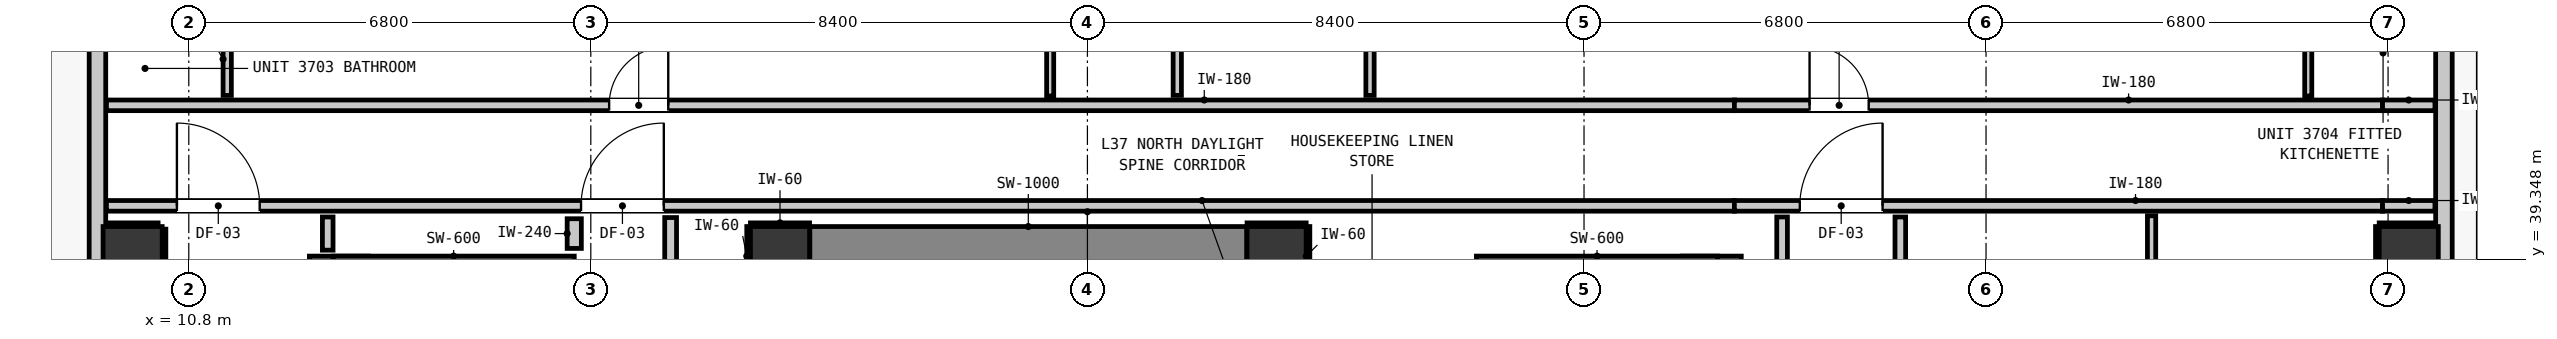
"""IFC4 building model, lengths in metres.
Left out: names, types, materials, properties, quantities, classifications, styles, units other than length and angle.
Written with IfcOpenShell. Run it as: python <this file> out.ifc"""

import sys

from ifc_helpers import new_model, si_unit, direction, frame, frame_2d, origin, origin_2d, place, context, subcontext, project, spatial, rectangle, extrude, element, fill, save


model = new_model("IFC4")
c1 = context("Model", 3, precision=1e-05, world=origin(), true_north=direction((0.0, 1.0)))
c2 = subcontext(c1, "Body", "Model", "MODEL_VIEW")
j1 = project(units=[si_unit("LENGTHUNIT", "METRE"), si_unit("PLANEANGLEUNIT", "RADIAN")], contexts=[c1])
p1 = place(None, origin())
s1 = spatial("IfcSite", under=j1, at=p1, CompositionType="ELEMENT")
p2 = place(p1, origin())
s2 = spatial("IfcBuilding", under=s1, at=p2, CompositionType="ELEMENT")
p3 = place(p2, frame((0.0, 0.0, 129.32)))
s3 = spatial("IfcBuildingStorey", under=s2, at=p3, CompositionType="ELEMENT", Elevation=129.32)
for number, where, z_axis, x_axis in (
    (1, (20.8, 39.4, 0.0), (0.0, 0.0, 1.0), (1.0, 0.0, 0.0)),
    (2, (29.2, 39.4, 0.0), (0.0, 0.0, 1.0), (1.0, 0.0, 0.0)),
):
    element("IfcColumn", number, at=place(p3, frame(where, z_axis=z_axis, x_axis=x_axis)), inside=s3, PredefinedType="COLUMN", context=c2, shape_type="SweptSolid", body=[
        extrude(rectangle(XDim=1.0, YDim=1.0, at=origin_2d()), origin(), (0.0, 0.0, 1.0), 3.32),
    ])
p4 = place(p3, frame((13.34, 31.205, 0.0), z_axis=(0.0, 0.0, 1.0), x_axis=(0.0, 1.0, 0.0)))
e3 = element("IfcWall", 3, at=p4, inside=s3, PredefinedType="SHEAR", context=c2, shape_type="SweptSolid", body=[
    extrude(rectangle(XDim=8.195, YDim=1.0, at=frame_2d((4.097, 0.0))), origin(), (0.0, 0.0, 1.0), 3.32),
])
p5 = place(p3, frame((13.24, 39.1, 0.0), z_axis=(0.0, 0.0, 1.0), x_axis=(1.0, 0.0, 0.0)))
e4 = element("IfcWall", 4, at=p5, inside=s3, PredefinedType="SHEAR", context=c2, shape_type="SweptSolid", body=[
    extrude(rectangle(XDim=4.08, YDim=0.6, at=frame_2d((2.04, 0.0))), origin(), (0.0, 0.0, 1.0), 3.32),
])
p6 = place(p3, frame((36.56, 31.205, 0.0), z_axis=(0.0, 0.0, 1.0), x_axis=(0.0, 1.0, 0.0)))
e5 = element("IfcWall", 5, at=p6, inside=s3, PredefinedType="SHEAR", context=c2, shape_type="SweptSolid", body=[
    extrude(rectangle(XDim=8.195, YDim=1.0, at=frame_2d((4.097, 0.0))), origin(), (0.0, 0.0, 1.0), 3.32),
])
p7 = place(p3, frame((32.58, 39.1, 0.0), z_axis=(0.0, 0.0, 1.0), x_axis=(1.0, 0.0, 0.0)))
e6 = element("IfcWall", 6, at=p7, inside=s3, PredefinedType="SHEAR", context=c2, shape_type="SweptSolid", body=[
    extrude(rectangle(XDim=4.08, YDim=0.6, at=frame_2d((2.04, 0.0))), origin(), (0.0, 0.0, 1.0), 3.32),
])
p8 = place(p3, frame((21.305, 39.4, 0.0), z_axis=(0.0, 0.0, 1.0), x_axis=(1.0, 0.0, 0.0)))
e7 = element("IfcWall", 7, at=p8, inside=s3, PredefinedType="SHEAR", context=c2, shape_type="SweptSolid", body=[
    extrude(rectangle(XDim=7.39, YDim=1.0, at=frame_2d((3.695, 0.0))), origin(), (0.0, 0.0, 1.0), 3.32),
])
for number, where, z_axis, x_axis in (
    (8, (9.85, 39.4, 0.0), (0.0, 0.0, 1.0), (1.0, 0.0, 0.0)),
    (9, (48.35, 39.4, 0.0), (0.0, 0.0, 1.0), (1.0, 0.0, 0.0)),
):
    element("IfcColumn", number, at=place(p3, frame(where, z_axis=z_axis, x_axis=x_axis)), inside=s3, PredefinedType="COLUMN", context=c2, shape_type="SweptSolid", body=[
        extrude(rectangle(XDim=1.0, YDim=1.0, at=origin_2d()), origin(), (0.0, 0.0, 1.0), 3.32),
    ])
p9 = place(p3, frame((9.255, 11.355, 0.0), z_axis=(0.0, 0.0, 1.0), x_axis=(0.0, 1.0, 0.0)))
e10 = element("IfcWall", 10, at=p9, inside=s3, PredefinedType="STANDARD", context=c2, shape_type="SweptSolid", body=[
    extrude(rectangle(XDim=32.29, YDim=0.28, at=frame_2d((16.145, 0.0))), origin(), (0.0, 0.0, 1.0), 3.08),
])
p10 = place(p9, frame((5.818, 0.0, 0.0)))
e11 = element("IfcOpeningElement", 11, at=p10, cuts=e10, PredefinedType="OPENING", context=c2, shape_type="SweptSolid", body=[
    extrude(rectangle(XDim=1.0, YDim=2.15, at=frame_2d((0.5, 1.075))), frame((0.0, 0.15, 0.0), z_axis=(0.0, -1.0, 0.0), x_axis=(1.0, 0.0, 0.0)), (0.0, 0.0, 1.0), 0.3),
])
p11 = place(p9, frame((0.544, 0.0, 0.85)))
e12 = element("IfcOpeningElement", 12, at=p11, cuts=e10, PredefinedType="OPENING", context=c2, shape_type="SweptSolid", body=[
    extrude(rectangle(XDim=1.05, YDim=1.65, at=frame_2d((0.525, 0.825))), frame((0.0, 0.15, 0.0), z_axis=(0.0, -1.0, 0.0), x_axis=(1.0, 0.0, 0.0)), (0.0, 0.0, 1.0), 0.3),
])
p12 = place(p3, frame((48.945, 43.645, 0.0), z_axis=(0.0, 0.0, 1.0), x_axis=(0.0, -1.0, 0.0)))
e13 = element("IfcWall", 13, at=p12, inside=s3, PredefinedType="STANDARD", context=c2, shape_type="SweptSolid", body=[
    extrude(rectangle(XDim=32.29, YDim=0.28, at=frame_2d((16.145, 0.0))), origin(), (0.0, 0.0, 1.0), 3.08),
])
p13 = place(p12, frame((5.467, 0.0, 0.0)))
e14 = element("IfcOpeningElement", 14, at=p13, cuts=e13, PredefinedType="OPENING", context=c2, shape_type="SweptSolid", body=[
    extrude(rectangle(XDim=1.0, YDim=2.15, at=frame_2d((0.5, 1.075))), frame((0.0, 0.15, 0.0), z_axis=(0.0, -1.0, 0.0), x_axis=(1.0, 0.0, 0.0)), (0.0, 0.0, 1.0), 0.3),
])
p14 = place(p12, frame((30.696, 0.0, 0.85)))
e15 = element("IfcOpeningElement", 15, at=p14, cuts=e13, PredefinedType="OPENING", context=c2, shape_type="SweptSolid", body=[
    extrude(rectangle(XDim=1.05, YDim=1.65, at=frame_2d((0.525, 0.825))), frame((0.0, 0.15, 0.0), z_axis=(0.0, -1.0, 0.0), x_axis=(1.0, 0.0, 0.0)), (0.0, 0.0, 1.0), 0.3),
])
p15 = place(p12, frame((14.761, 0.0, 0.85)))
e16 = element("IfcOpeningElement", 16, at=p15, cuts=e13, PredefinedType="OPENING", context=c2, shape_type="SweptSolid", body=[
    extrude(rectangle(XDim=1.8, YDim=1.9, at=frame_2d((0.9, 0.95))), frame((0.0, 0.15, 0.0), z_axis=(0.0, -1.0, 0.0), x_axis=(1.0, 0.0, 0.0)), (0.0, 0.0, 1.0), 0.3),
])
p16 = place(p12, frame((7.106, 0.0, 0.85)))
e17 = element("IfcOpeningElement", 17, at=p16, cuts=e13, PredefinedType="OPENING", context=c2, shape_type="SweptSolid", body=[
    extrude(rectangle(XDim=1.05, YDim=1.65, at=frame_2d((0.525, 0.825))), frame((0.0, 0.15, 0.0), z_axis=(0.0, -1.0, 0.0), x_axis=(1.0, 0.0, 0.0)), (0.0, 0.0, 1.0), 0.3),
])
p17 = place(p3, frame((9.407, 40.25, 0.0), z_axis=(0.0, 0.0, 1.0), x_axis=(1.0, 0.0, 0.0)))
e18 = element("IfcWall", 18, at=p17, inside=s3, PredefinedType="PARTITIONING", context=c2, shape_type="SweptSolid", body=[
    extrude(rectangle(XDim=27.536, YDim=0.18, at=frame_2d((13.768, 0.0))), origin(), (0.0, 0.0, 1.0), 3.08),
])
p18 = place(p17, frame((8.028, 0.0, 0.0)))
e19 = element("IfcOpeningElement", 19, at=p18, cuts=e18, PredefinedType="OPENING", context=c2, shape_type="SweptSolid", body=[
    extrude(rectangle(XDim=1.4, YDim=2.15, at=frame_2d((0.7, 1.075))), frame((0.0, 0.1, 0.0), z_axis=(0.0, -1.0, 0.0), x_axis=(1.0, 0.0, 0.0)), (0.0, 0.0, 1.0), 0.2),
])
p19 = place(p17, frame((1.192, 0.0, 0.0)))
e20 = element("IfcOpeningElement", 20, at=p19, cuts=e18, PredefinedType="OPENING", context=c2, shape_type="SweptSolid", body=[
    extrude(rectangle(XDim=1.4, YDim=2.15, at=frame_2d((0.7, 1.075))), frame((0.0, 0.1, 0.0), z_axis=(0.0, -1.0, 0.0), x_axis=(1.0, 0.0, 0.0)), (0.0, 0.0, 1.0), 0.2),
])
p20 = place(p3, frame((36.943, 40.25, 0.0), z_axis=(0.0, 0.0, 1.0), x_axis=(1.0, 0.0, 0.0)))
e21 = element("IfcWall", 21, at=p20, inside=s3, PredefinedType="PARTITIONING", context=c2, shape_type="SweptSolid", body=[
    extrude(rectangle(XDim=10.964, YDim=0.18, at=frame_2d((5.482, 0.0))), origin(), (0.0, 0.0, 1.0), 2.565),
])
p21 = place(p20, frame((1.107, 0.0, 0.0)))
e22 = element("IfcOpeningElement", 22, at=p21, cuts=e21, PredefinedType="OPENING", context=c2, shape_type="SweptSolid", body=[
    extrude(rectangle(XDim=1.4, YDim=2.15, at=frame_2d((0.7, 1.075))), frame((0.0, 0.1, 0.0), z_axis=(0.0, -1.0, 0.0), x_axis=(1.0, 0.0, 0.0)), (0.0, 0.0, 1.0), 0.2),
])
p22 = place(p3, frame((47.907, 40.25, 0.0), z_axis=(0.0, 0.0, 1.0), x_axis=(1.0, 0.0, 0.0)))
e23 = element("IfcWall", 23, at=p22, inside=s3, PredefinedType="PARTITIONING", context=c2, shape_type="SweptSolid", body=[
    extrude(rectangle(XDim=0.886, YDim=0.18, at=frame_2d((0.443, 0.0))), origin(), (0.0, 0.0, 1.0), 3.08),
])
p23 = place(p3, frame((9.407, 41.95, 0.0), z_axis=(0.0, 0.0, 1.0), x_axis=(1.0, 0.0, 0.0)))
e24 = element("IfcWall", 24, at=p23, inside=s3, PredefinedType="PARTITIONING", context=c2, shape_type="SweptSolid", body=[
    extrude(rectangle(XDim=27.536, YDim=0.18, at=frame_2d((13.768, 0.0))), origin(), (0.0, 0.0, 1.0), 3.08),
])
p24 = place(p23, frame((8.503, 0.0, 0.0)))
e25 = element("IfcOpeningElement", 25, at=p24, cuts=e24, PredefinedType="OPENING", context=c2, shape_type="SweptSolid", body=[
    extrude(rectangle(XDim=1.0, YDim=2.15, at=frame_2d((0.5, 1.075))), frame((0.0, 0.1, 0.0), z_axis=(0.0, -1.0, 0.0), x_axis=(1.0, 0.0, 0.0)), (0.0, 0.0, 1.0), 0.2),
])
p25 = place(p3, frame((36.943, 41.95, 0.0), z_axis=(0.0, 0.0, 1.0), x_axis=(1.0, 0.0, 0.0)))
e26 = element("IfcWall", 26, at=p25, inside=s3, PredefinedType="PARTITIONING", context=c2, shape_type="SweptSolid", body=[
    extrude(rectangle(XDim=10.964, YDim=0.18, at=frame_2d((5.482, 0.0))), origin(), (0.0, 0.0, 1.0), 2.565),
])
p26 = place(p25, frame((1.272, 0.0, 0.0)))
e27 = element("IfcOpeningElement", 27, at=p26, cuts=e26, PredefinedType="OPENING", context=c2, shape_type="SweptSolid", body=[
    extrude(rectangle(XDim=1.0, YDim=2.15, at=frame_2d((0.5, 1.075))), frame((0.0, 0.1, 0.0), z_axis=(0.0, -1.0, 0.0), x_axis=(1.0, 0.0, 0.0)), (0.0, 0.0, 1.0), 0.2),
])
p27 = place(p3, frame((47.907, 41.95, 0.0), z_axis=(0.0, 0.0, 1.0), x_axis=(1.0, 0.0, 0.0)))
e28 = element("IfcWall", 28, at=p27, inside=s3, PredefinedType="PARTITIONING", context=c2, shape_type="SweptSolid", body=[
    extrude(rectangle(XDim=0.886, YDim=0.18, at=frame_2d((0.443, 0.0))), origin(), (0.0, 0.0, 1.0), 3.08),
])
p28 = place(p3, frame((17.32, 39.53, 0.0), z_axis=(0.0, 0.0, 1.0), x_axis=(0.0, 1.0, 0.0)))
e29 = element("IfcWall", 29, at=p28, inside=s3, PredefinedType="PARTITIONING", context=c2, shape_type="SweptSolid", body=[
    extrude(rectangle(XDim=0.502, YDim=0.24, at=frame_2d((0.251, 0.0))), origin(), (0.0, 0.0, 1.0), 3.08),
])
p29 = place(p3, frame((18.95, 38.918, 0.0), z_axis=(0.0, 0.0, 1.0), x_axis=(0.0, 1.0, 0.0)))
e30 = element("IfcWall", 30, at=p29, inside=s3, PredefinedType="PARTITIONING", context=c2, shape_type="SweptSolid", body=[
    extrude(rectangle(XDim=1.134, YDim=0.2, at=frame_2d((0.567, 0.0))), origin(), (0.0, 0.0, 1.0), 3.08),
])
p30 = place(p3, frame((13.15, 39.5, 0.0), z_axis=(0.0, 0.0, 1.0), x_axis=(0.0, 1.0, 0.0)))
e31 = element("IfcWall", 31, at=p30, inside=s3, PredefinedType="PARTITIONING", context=c2, shape_type="SweptSolid", body=[
    extrude(rectangle(XDim=0.562, YDim=0.18, at=frame_2d((0.281, 0.0))), origin(), (0.0, 0.0, 1.0), 2.315),
])
p31 = place(p3, frame((37.75, 21.368, 0.0), z_axis=(0.0, 0.0, 1.0), x_axis=(0.0, 1.0, 0.0)))
e32 = element("IfcWall", 32, at=p31, inside=s3, PredefinedType="PARTITIONING", context=c2, shape_type="SweptSolid", body=[
    extrude(rectangle(XDim=18.694, YDim=0.18, at=frame_2d((9.347, 0.0))), origin(), (0.0, 0.0, 1.0), 3.08),
])
p32 = place(p3, frame((39.75, 35.118, 0.0), z_axis=(0.0, 0.0, 1.0), x_axis=(0.0, 1.0, 0.0)))
e33 = element("IfcWall", 33, at=p32, inside=s3, PredefinedType="PARTITIONING", context=c2, shape_type="SweptSolid", body=[
    extrude(rectangle(XDim=4.944, YDim=0.18, at=frame_2d((2.472, 0.0))), origin(), (0.0, 0.0, 1.0), 3.08),
])
p33 = place(p3, frame((11.45, 42.118, 0.0), z_axis=(0.0, 0.0, 1.0), x_axis=(0.0, 1.0, 0.0)))
e34 = element("IfcWall", 34, at=p33, inside=s3, PredefinedType="PARTITIONING", context=c2, shape_type="SweptSolid", body=[
    extrude(rectangle(XDim=2.808, YDim=0.14, at=frame_2d((1.404, 0.0))), origin(), (0.0, 0.0, 1.0), 2.565),
])
p34 = place(p33, frame((1.327, 0.0, 0.0)))
e35 = element("IfcOpeningElement", 35, at=p34, cuts=e34, PredefinedType="OPENING", context=c2, shape_type="SweptSolid", body=[
    extrude(rectangle(XDim=0.86, YDim=2.02, at=frame_2d((0.43, 1.01))), frame((0.0, 0.08, 0.0), z_axis=(0.0, -1.0, 0.0), x_axis=(1.0, 0.0, 0.0)), (0.0, 0.0, 1.0), 0.16),
])
p35 = place(p3, frame((27.52, 42.118, 0.0), z_axis=(0.0, 0.0, 1.0), x_axis=(0.0, 1.0, 0.0)))
e36 = element("IfcWall", 36, at=p35, inside=s3, PredefinedType="PARTITIONING", context=c2, shape_type="SweptSolid", body=[
    extrude(rectangle(XDim=3.675, YDim=0.14, at=frame_2d((1.837, 0.0))), origin(), (0.0, 0.0, 1.0), 3.08),
])
p36 = place(p3, frame((30.78, 42.118, 0.0), z_axis=(0.0, 0.0, 1.0), x_axis=(0.0, 1.0, 0.0)))
e37 = element("IfcWall", 37, at=p36, inside=s3, PredefinedType="PARTITIONING", context=c2, shape_type="SweptSolid", body=[
    extrude(rectangle(XDim=3.675, YDim=0.14, at=frame_2d((1.837, 0.0))), origin(), (0.0, 0.0, 1.0), 3.08),
])
p37 = place(p36, frame((1.327, 0.0, 0.0)))
e38 = element("IfcOpeningElement", 38, at=p37, cuts=e37, PredefinedType="OPENING", context=c2, shape_type="SweptSolid", body=[
    extrude(rectangle(XDim=0.86, YDim=2.02, at=frame_2d((0.43, 1.01))), frame((0.0, 0.08, 0.0), z_axis=(0.0, -1.0, 0.0), x_axis=(1.0, 0.0, 0.0)), (0.0, 0.0, 1.0), 0.16),
])
p38 = place(p3, frame((44.0, 35.098, 0.0), z_axis=(0.0, 0.0, 1.0), x_axis=(0.0, 1.0, 0.0)))
e39 = element("IfcWall", 39, at=p38, inside=s3, PredefinedType="PARTITIONING", context=c2, shape_type="SweptSolid", body=[
    extrude(rectangle(XDim=4.984, YDim=0.14, at=frame_2d((2.492, 0.0))), origin(), (0.0, 0.0, 1.0), 3.08),
])
p39 = place(p3, frame((25.37, 42.108, 0.0), z_axis=(0.0, 0.0, 1.0), x_axis=(0.0, 1.0, 0.0)))
e40 = element("IfcWall", 40, at=p39, inside=s3, PredefinedType="PARTITIONING", context=c2, shape_type="SweptSolid", body=[
    extrude(rectangle(XDim=3.685, YDim=0.12, at=frame_2d((1.843, 0.0))), origin(), (0.0, 0.0, 1.0), 3.08),
])
p40 = place(p39, frame((1.317, 0.0, 0.0)))
e41 = element("IfcOpeningElement", 41, at=p40, cuts=e40, PredefinedType="OPENING", context=c2, shape_type="SweptSolid", body=[
    extrude(rectangle(XDim=0.9, YDim=2.1, at=frame_2d((0.45, 1.05))), frame((0.0, 0.07, 0.0), z_axis=(0.0, -1.0, 0.0), x_axis=(1.0, 0.0, 0.0)), (0.0, 0.0, 1.0), 0.14),
])
p41 = place(p3, frame((46.65, 42.108, 0.0), z_axis=(0.0, 0.0, 1.0), x_axis=(0.0, 1.0, 0.0)))
e42 = element("IfcWall", 42, at=p41, inside=s3, PredefinedType="PARTITIONING", context=c2, shape_type="SweptSolid", body=[
    extrude(rectangle(XDim=3.617, YDim=0.12, at=frame_2d((1.809, 0.0))), origin(), (0.0, 0.0, 1.0), 3.08),
])
p42 = place(p41, frame((1.317, 0.0, 0.0)))
e43 = element("IfcOpeningElement", 43, at=p42, cuts=e42, PredefinedType="OPENING", context=c2, shape_type="SweptSolid", body=[
    extrude(rectangle(XDim=0.9, YDim=2.1, at=frame_2d((0.45, 1.05))), frame((0.0, 0.07, 0.0), z_axis=(0.0, -1.0, 0.0), x_axis=(1.0, 0.0, 0.0)), (0.0, 0.0, 1.0), 0.14),
])
for number, where, z_axis, x_axis in (
    (44, (20.3, 39.932, 0.0), (0.0, 0.0, 1.0), (1.0, 0.0, 0.0)),
    (45, (20.268, 38.9, 0.0), (0.0, 0.0, 1.0), (0.0, 1.0, 0.0)),
    (46, (28.7, 39.932, 0.0), (0.0, 0.0, 1.0), (1.0, 0.0, 0.0)),
    (47, (29.732, 38.9, 0.0), (0.0, 0.0, 1.0), (0.0, 1.0, 0.0)),
):
    element("IfcWall", number, at=place(p3, frame(where, z_axis=z_axis, x_axis=x_axis)), inside=s3, PredefinedType="PARTITIONING", context=c2, shape_type="SweptSolid", body=[
        extrude(rectangle(XDim=1.0, YDim=0.06, at=frame_2d((0.5, 0.0))), origin(), (0.0, 0.0, 1.0), 1.45),
    ])
p43 = place(p3, frame((9.41, 39.932, 0.0), z_axis=(0.0, 0.0, 1.0), x_axis=(1.0, 0.0, 0.0)))
e48 = element("IfcWall", 48, at=p43, inside=s3, PredefinedType="PARTITIONING", context=c2, shape_type="SweptSolid", body=[
    extrude(rectangle(XDim=0.871, YDim=0.06, at=frame_2d((0.436, 0.0))), origin(), (0.0, 0.0, 1.0), 1.45),
])
p44 = place(p3, frame((10.382, 38.9, 0.0), z_axis=(0.0, 0.0, 1.0), x_axis=(0.0, 1.0, 0.0)))
e49 = element("IfcWall", 49, at=p44, inside=s3, PredefinedType="PARTITIONING", context=c2, shape_type="SweptSolid", body=[
    extrude(rectangle(XDim=0.956, YDim=0.06, at=frame_2d((0.478, 0.0))), origin(), (0.0, 0.0, 1.0), 1.45),
])
p45 = place(p3, frame((47.85, 39.932, 0.0), z_axis=(0.0, 0.0, 1.0), x_axis=(1.0, 0.0, 0.0)))
e50 = element("IfcWall", 50, at=p45, inside=s3, PredefinedType="PARTITIONING", context=c2, shape_type="SweptSolid", body=[
    extrude(rectangle(XDim=0.94, YDim=0.06, at=frame_2d((0.47, 0.0))), origin(), (0.0, 0.0, 1.0), 1.45),
])
p46 = place(p3, frame((47.818, 38.9, 0.0), z_axis=(0.0, 0.0, 1.0), x_axis=(0.0, 1.0, 0.0)))
e51 = element("IfcWall", 51, at=p46, inside=s3, PredefinedType="PARTITIONING", context=c2, shape_type="SweptSolid", body=[
    extrude(rectangle(XDim=1.0, YDim=0.06, at=frame_2d((0.5, 0.0))), origin(), (0.0, 0.0, 1.0), 1.45),
])
p47 = place(p18, origin())
e52 = element("IfcDoor", 52, at=p47, inside=s3, OperationType="SINGLE_SWING_RIGHT", PredefinedType="DOOR", context=c2, shape_type="SweptSolid", body=[
    extrude(rectangle(XDim=1.4, YDim=2.15, at=frame_2d((0.7, 1.075))), frame((0.0, 0.025, 0.0), z_axis=(0.0, -1.0, 0.0), x_axis=(1.0, 0.0, 0.0)), (0.0, 0.0, 1.0), 0.05),
])
fill(e19, e52)
p48 = place(p19, origin())
e53 = element("IfcDoor", 53, at=p48, inside=s3, OperationType="SINGLE_SWING_LEFT", PredefinedType="DOOR", context=c2, shape_type="SweptSolid", body=[
    extrude(rectangle(XDim=1.4, YDim=2.15, at=frame_2d((0.7, 1.075))), frame((0.0, 0.025, 0.0), z_axis=(0.0, -1.0, 0.0), x_axis=(1.0, 0.0, 0.0)), (0.0, 0.0, 1.0), 0.05),
])
fill(e20, e53)
p49 = place(p21, origin())
e54 = element("IfcDoor", 54, at=p49, inside=s3, OperationType="SINGLE_SWING_RIGHT", PredefinedType="DOOR", context=c2, shape_type="SweptSolid", body=[
    extrude(rectangle(XDim=1.4, YDim=2.15, at=frame_2d((0.7, 1.075))), frame((0.0, 0.025, 0.0), z_axis=(0.0, -1.0, 0.0), x_axis=(1.0, 0.0, 0.0)), (0.0, 0.0, 1.0), 0.05),
])
fill(e22, e54)
p50 = place(p24, origin())
e55 = element("IfcDoor", 55, at=p50, inside=s3, OperationType="SINGLE_SWING_RIGHT", PredefinedType="DOOR", context=c2, shape_type="SweptSolid", body=[
    extrude(rectangle(XDim=1.0, YDim=2.15, at=frame_2d((0.5, 1.075))), frame((0.0, 0.025, 0.0), z_axis=(0.0, -1.0, 0.0), x_axis=(1.0, 0.0, 0.0)), (0.0, 0.0, 1.0), 0.05),
])
fill(e25, e55)
p51 = place(p26, origin())
e56 = element("IfcDoor", 56, at=p51, inside=s3, OperationType="SINGLE_SWING_LEFT", PredefinedType="DOOR", context=c2, shape_type="SweptSolid", body=[
    extrude(rectangle(XDim=1.0, YDim=2.15, at=frame_2d((0.5, 1.075))), frame((0.0, 0.025, 0.0), z_axis=(0.0, -1.0, 0.0), x_axis=(1.0, 0.0, 0.0)), (0.0, 0.0, 1.0), 0.05),
])
fill(e27, e56)
save(model, sys.argv[1])
